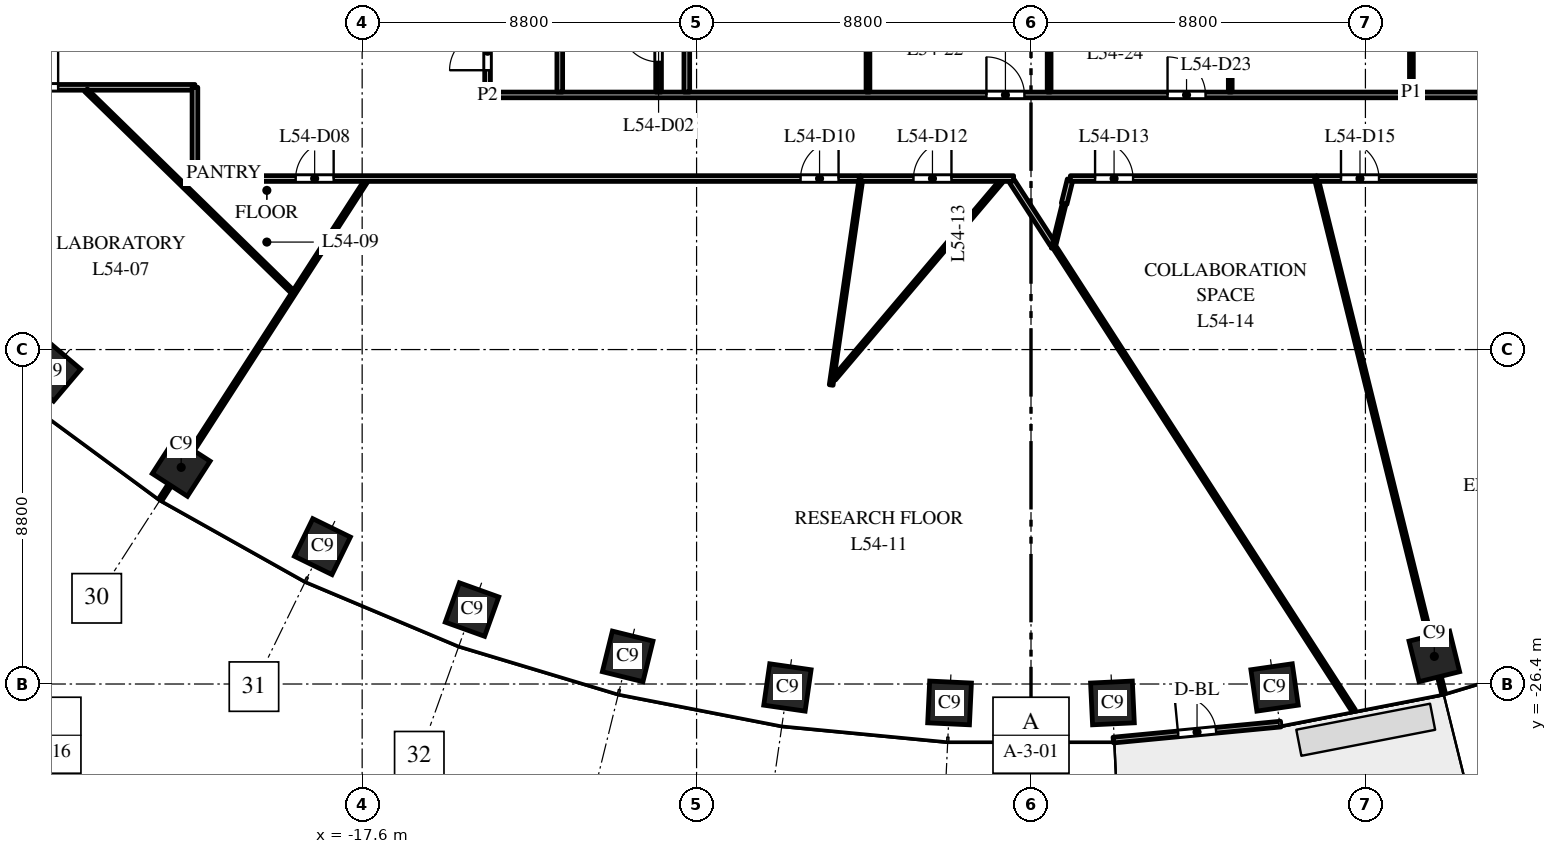
"""IFC4 building model, lengths in metres.
Left out: names, types, materials, properties, quantities, classifications, styles, units other than length and angle.
Written with IfcOpenShell. Run it as: python <this file> out.ifc"""

import sys

from ifc_helpers import new_model, si_unit, direction, frame, frame_2d, origin, origin_2d, place, context, subcontext, project, spatial, rectangle, extrude, element, fill, save


model = new_model("IFC4")
c1 = context("Model", 3, precision=1e-05, world=origin(), true_north=direction((0.0, 1.0)))
c2 = subcontext(c1, "Body", "Model", "MODEL_VIEW")
j1 = project(units=[si_unit("LENGTHUNIT", "METRE"), si_unit("PLANEANGLEUNIT", "RADIAN")], contexts=[c1])
p1 = place(None, origin())
s1 = spatial("IfcSite", under=j1, at=p1, CompositionType="ELEMENT")
p2 = place(p1, origin())
s2 = spatial("IfcBuilding", under=s1, at=p2, CompositionType="ELEMENT")
p3 = place(p2, frame((0.0, 0.0, 257.5)))
s3 = spatial("IfcBuildingStorey", under=s2, at=p3, CompositionType="ELEMENT", Elevation=257.5)
for number, where, z_axis, x_axis in (
    (1, (-25.783, -18.18, 0.0), (0.0, 0.0, 1.0), (0.763, -0.646, 0.0)),
    (2, (-22.362, -20.7, 0.0), (0.0, 0.0, 1.0), (0.84, -0.542, 0.0)),
    (3, (-18.646, -22.785, 0.0), (0.0, 0.0, 1.0), (0.898, -0.439, 0.0)),
    (4, (-14.709, -24.441, 0.0), (0.0, 0.0, 1.0), (0.941, -0.338, 0.0)),
    (5, (-10.613, -25.674, 0.0), (0.0, 0.0, 1.0), (0.971, -0.24, 0.0)),
    (6, (-6.409, -26.491, 0.0), (0.0, 0.0, 1.0), (0.99, -0.143, 0.0)),
    (7, (-2.143, -26.898, 0.0), (0.0, 0.0, 1.0), (0.999, -0.048, 0.0)),
    (8, (2.143, -26.898, 0.0), (0.0, 0.0, 1.0), (0.999, 0.048, 0.0)),
    (9, (6.409, -26.491, 0.0), (0.0, 0.0, 1.0), (0.99, 0.143, 0.0)),
    (10, (10.613, -25.674, 0.0), (0.0, 0.0, 1.0), (0.971, 0.24, 0.0)),
):
    element("IfcColumn", number, at=place(p3, frame(where, z_axis=z_axis, x_axis=x_axis)), inside=s3, PredefinedType="COLUMN", context=c2, shape_type="SweptSolid", body=[
        extrude(rectangle(XDim=1.1, YDim=1.1, at=origin_2d()), origin(), (0.0, 0.0, 1.0), 4.0),
    ])
p4 = place(p3, frame((2.166, -27.875, 0.0), z_axis=(0.0, 0.0, 1.0), x_axis=(0.995473879823, 0.095035543824, 0.0)))
e11 = element("IfcWall", 11, at=p4, inside=s3, PredefinedType="STANDARD", context=c2, shape_type="SweptSolid", body=[
    extrude(rectangle(XDim=4.426, YDim=0.15, at=frame_2d((2.213, 0.0))), origin(), (0.0, 0.0, 1.0), 3.7),
])
p5 = place(p4, frame((1.713, 0.0, 0.0)))
e12 = element("IfcOpeningElement", 12, at=p5, cuts=e11, PredefinedType="OPENING", context=c2, shape_type="SweptSolid", body=[
    extrude(rectangle(XDim=1.0, YDim=2.4, at=frame_2d((0.5, 1.2))), frame((0.0, 0.085, 0.0), z_axis=(0.0, -1.0, 0.0), x_axis=(1.0, 0.0, 0.0)), (0.0, 0.0, 1.0), 0.17),
])
p6 = place(p3, frame((-31.5, -10.7, 0.0), z_axis=(0.0, 0.0, 1.0), x_axis=(1.0, 0.0, 0.0)))
e13 = element("IfcWall", 13, at=p6, inside=s3, PredefinedType="PARTITIONING", context=c2, shape_type="SweptSolid", body=[
    extrude(rectangle(XDim=9.5, YDim=0.15, at=frame_2d((4.75, 0.0))), origin(), (0.0, 0.0, 1.0), 3.1),
])
p7 = place(p6, frame((4.9, 0.0, 0.0)))
e14 = element("IfcOpeningElement", 14, at=p7, cuts=e13, PredefinedType="OPENING", context=c2, shape_type="SweptSolid", body=[
    extrude(rectangle(XDim=1.0, YDim=2.1, at=frame_2d((0.5, 1.05))), frame((0.0, 0.085, 0.0), z_axis=(0.0, -1.0, 0.0), x_axis=(1.0, 0.0, 0.0)), (0.0, 0.0, 1.0), 0.17),
])
p8 = place(p3, frame((-24.866, -10.778, 0.0), z_axis=(0.0, 0.0, 1.0), x_axis=(0.715632814242, -0.698476681916, 0.0)))
e15 = element("IfcWall", 15, at=p8, inside=s3, PredefinedType="PARTITIONING", context=c2, shape_type="SweptSolid", body=[
    extrude(rectangle(XDim=7.585, YDim=0.1, at=frame_2d((3.792, 0.0))), origin(), (0.0, 0.0, 1.0), 2.75),
])
p9 = place(p3, frame((-22.905, -21.542, 0.0), z_axis=(0.0, 0.0, 1.0), x_axis=(0.542277075573, 0.840199722273, 0.0)))
e16 = element("IfcWall", 16, at=p9, inside=s3, PredefinedType="PARTITIONING", context=c2, shape_type="SweptSolid", body=[
    extrude(rectangle(XDim=9.958, YDim=0.1, at=frame_2d((4.979, 0.0))), origin(), (0.0, 0.0, 1.0), 3.0),
])
p10 = place(p3, frame((-22.0, -13.1, 0.0), z_axis=(0.0, 0.0, 1.0), x_axis=(0.0, 1.0, 0.0)))
e17 = element("IfcWall", 17, at=p10, inside=s3, PredefinedType="PARTITIONING", context=c2, shape_type="SweptSolid", body=[
    extrude(rectangle(XDim=2.4, YDim=0.15, at=frame_2d((1.2, 0.0))), origin(), (0.0, 0.0, 1.0), 3.7),
])
p11 = place(p3, frame((-22.0, -13.1, 0.0), z_axis=(0.0, 0.0, 1.0), x_axis=(1.0, 0.0, 0.0)))
e18 = element("IfcWall", 18, at=p11, inside=s3, PredefinedType="PARTITIONING", context=c2, shape_type="SweptSolid", body=[
    extrude(rectangle(XDim=17.507, YDim=0.15, at=frame_2d((8.753, 0.0))), origin(), (0.0, 0.0, 1.0), 2.75),
])
p12 = place(p11, frame((2.65, 0.0, 0.0)))
e19 = element("IfcOpeningElement", 19, at=p12, cuts=e18, PredefinedType="OPENING", context=c2, shape_type="SweptSolid", body=[
    extrude(rectangle(XDim=1.0, YDim=2.1, at=frame_2d((0.5, 1.05))), frame((0.0, 0.085, 0.0), z_axis=(0.0, -1.0, 0.0), x_axis=(1.0, 0.0, 0.0)), (0.0, 0.0, 1.0), 0.17),
])
p13 = place(p11, frame((15.936, 0.0, 0.0)))
e20 = element("IfcOpeningElement", 20, at=p13, cuts=e18, PredefinedType="OPENING", context=c2, shape_type="SweptSolid", body=[
    extrude(rectangle(XDim=1.0, YDim=2.1, at=frame_2d((0.5, 1.05))), frame((0.0, 0.085, 0.0), z_axis=(0.0, -1.0, 0.0), x_axis=(1.0, 0.0, 0.0)), (0.0, 0.0, 1.0), 0.17),
])
p14 = place(p3, frame((-14.3, -10.9, 0.0), z_axis=(0.0, 0.0, 1.0), x_axis=(0.0, 1.0, 0.0)))
e21 = element("IfcWall", 21, at=p14, inside=s3, PredefinedType="PARTITIONING", context=c2, shape_type="SweptSolid", body=[
    extrude(rectangle(XDim=21.8, YDim=0.15, at=frame_2d((10.9, 0.0))), origin(), (0.0, 0.0, 1.0), 2.75),
])
p15 = place(p14, frame((0.65, 0.0, 0.0)))
e22 = element("IfcOpeningElement", 22, at=p15, cuts=e21, PredefinedType="OPENING", context=c2, shape_type="SweptSolid", body=[
    extrude(rectangle(XDim=1.0, YDim=2.1, at=frame_2d((0.5, 1.05))), frame((0.0, 0.085, 0.0), z_axis=(0.0, -1.0, 0.0), x_axis=(1.0, 0.0, 0.0)), (0.0, 0.0, 1.0), 0.17),
])
p16 = place(p3, frame((-14.3, -10.9, 0.0), z_axis=(0.0, 0.0, 1.0), x_axis=(1.0, 0.0, 0.0)))
e23 = element("IfcWall", 23, at=p16, inside=s3, PredefinedType="PARTITIONING", context=c2, shape_type="SweptSolid", body=[
    extrude(rectangle(XDim=28.6, YDim=0.15, at=frame_2d((14.3, 0.0))), origin(), (0.0, 0.0, 1.0), 2.85),
])
p17 = place(p16, frame((13.127, 0.0, 0.0)))
e24 = element("IfcOpeningElement", 24, at=p17, cuts=e23, PredefinedType="OPENING", context=c2, shape_type="SweptSolid", body=[
    extrude(rectangle(XDim=1.0, YDim=2.1, at=frame_2d((0.5, 1.05))), frame((0.0, 0.085, 0.0), z_axis=(0.0, -1.0, 0.0), x_axis=(1.0, 0.0, 0.0)), (0.0, 0.0, 1.0), 0.17),
])
p18 = place(p16, frame((17.893, 0.0, 0.0)))
e25 = element("IfcOpeningElement", 25, at=p18, cuts=e23, PredefinedType="OPENING", context=c2, shape_type="SweptSolid", body=[
    extrude(rectangle(XDim=1.0, YDim=2.1, at=frame_2d((0.5, 1.05))), frame((0.0, 0.085, 0.0), z_axis=(0.0, -1.0, 0.0), x_axis=(1.0, 0.0, 0.0)), (0.0, 0.0, 1.0), 0.17),
])
p19 = place(p3, frame((-12.4, -10.825, 0.0), z_axis=(0.0, 0.0, 1.0), x_axis=(0.0, 1.0, 0.0)))
e26 = element("IfcWall", 26, at=p19, inside=s3, PredefinedType="PARTITIONING", context=c2, shape_type="SweptSolid", body=[
    extrude(rectangle(XDim=7.065, YDim=0.15, at=frame_2d((3.532, 0.0))), origin(), (0.0, 0.0, 1.0), 2.75),
])
p20 = place(p19, frame((3.095, 0.0, 0.0)))
e27 = element("IfcOpeningElement", 27, at=p20, cuts=e26, PredefinedType="OPENING", context=c2, shape_type="SweptSolid", body=[
    extrude(rectangle(XDim=1.0, YDim=2.1, at=frame_2d((0.5, 1.05))), frame((0.0, 0.085, 0.0), z_axis=(0.0, -1.0, 0.0), x_axis=(1.0, 0.0, 0.0)), (0.0, 0.0, 1.0), 0.17),
])
p21 = place(p19, frame((5.447, 0.0, 0.0)))
e28 = element("IfcOpeningElement", 28, at=p21, cuts=e26, PredefinedType="OPENING", context=c2, shape_type="SweptSolid", body=[
    extrude(rectangle(XDim=1.0, YDim=2.1, at=frame_2d((0.5, 1.05))), frame((0.0, 0.085, 0.0), z_axis=(0.0, -1.0, 0.0), x_axis=(1.0, 0.0, 0.0)), (0.0, 0.0, 1.0), 0.17),
])
p22 = place(p3, frame((-9.8, -10.825, 0.0), z_axis=(0.0, 0.0, 1.0), x_axis=(0.0, 1.0, 0.0)))
e29 = element("IfcWall", 29, at=p22, inside=s3, PredefinedType="PARTITIONING", context=c2, shape_type="SweptSolid", body=[
    extrude(rectangle(XDim=7.065, YDim=0.15, at=frame_2d((3.532, 0.0))), origin(), (0.0, 0.0, 1.0), 2.75),
])
p23 = place(p22, frame((0.795, 0.0, 0.0)))
e30 = element("IfcOpeningElement", 30, at=p23, cuts=e29, PredefinedType="OPENING", context=c2, shape_type="SweptSolid", body=[
    extrude(rectangle(XDim=1.0, YDim=2.1, at=frame_2d((0.5, 1.05))), frame((0.0, 0.085, 0.0), z_axis=(0.0, -1.0, 0.0), x_axis=(1.0, 0.0, 0.0)), (0.0, 0.0, 1.0), 0.17),
])
p24 = place(p3, frame((-9.057, -10.825, 0.0), z_axis=(0.0, 0.0, 1.0), x_axis=(0.0, 1.0, 0.0)))
e31 = element("IfcWall", 31, at=p24, inside=s3, PredefinedType="PARTITIONING", context=c2, shape_type="SweptSolid", body=[
    extrude(rectangle(XDim=10.78, YDim=0.15, at=frame_2d((5.39, 0.0))), origin(), (0.0, 0.0, 1.0), 2.75),
])
p25 = place(p24, frame((2.075, 0.0, 0.0)))
e32 = element("IfcOpeningElement", 32, at=p25, cuts=e31, PredefinedType="OPENING", context=c2, shape_type="SweptSolid", body=[
    extrude(rectangle(XDim=1.0, YDim=2.1, at=frame_2d((0.5, 1.05))), frame((0.0, 0.085, 0.0), z_axis=(0.0, -1.0, 0.0), x_axis=(1.0, 0.0, 0.0)), (0.0, 0.0, 1.0), 0.17),
])
p26 = place(p3, frame((-5.258, -18.533, 0.0), z_axis=(0.0, 0.0, 1.0), x_axis=(0.143033857536, 0.989717795939, 0.0)))
e33 = element("IfcWall", 33, at=p26, inside=s3, PredefinedType="PARTITIONING", context=c2, shape_type="SweptSolid", body=[
    extrude(rectangle(XDim=5.489, YDim=0.1, at=frame_2d((2.745, 0.0))), origin(), (0.0, 0.0, 1.0), 3.7),
])
p27 = place(p3, frame((-5.184, -18.368, 0.0), z_axis=(0.0, 0.0, 1.0), x_axis=(0.646387569677, 0.763009246187, 0.0)))
e34 = element("IfcWall", 34, at=p27, inside=s3, PredefinedType="PARTITIONING", context=c2, shape_type="SweptSolid", body=[
    extrude(rectangle(XDim=6.806, YDim=0.1, at=frame_2d((3.403, 0.0))), origin(), (0.0, 0.0, 1.0), 2.85),
])
p28 = place(p3, frame((-4.473, -13.1, 0.0), z_axis=(0.0, 0.0, 1.0), x_axis=(1.0, 0.0, 0.0)))
e35 = element("IfcWall", 35, at=p28, inside=s3, PredefinedType="PARTITIONING", context=c2, shape_type="SweptSolid", body=[
    extrude(rectangle(XDim=4.015, YDim=0.15, at=frame_2d((2.007, 0.0))), origin(), (0.0, 0.0, 1.0), 2.85),
])
p29 = place(p28, frame((1.38, 0.0, 0.0)))
e36 = element("IfcOpeningElement", 36, at=p29, cuts=e35, PredefinedType="OPENING", context=c2, shape_type="SweptSolid", body=[
    extrude(rectangle(XDim=1.0, YDim=2.1, at=frame_2d((0.5, 1.05))), frame((0.0, 0.085, 0.0), z_axis=(0.0, -1.0, 0.0), x_axis=(1.0, 0.0, 0.0)), (0.0, 0.0, 1.0), 0.17),
])
p30 = place(p3, frame((-4.29, -10.825, 0.0), z_axis=(0.0, 0.0, 1.0), x_axis=(0.0, 1.0, 0.0)))
e37 = element("IfcWall", 37, at=p30, inside=s3, PredefinedType="PARTITIONING", context=c2, shape_type="SweptSolid", body=[
    extrude(rectangle(XDim=4.257, YDim=0.1, at=frame_2d((2.128, 0.0))), origin(), (0.0, 0.0, 1.0), 2.85),
])
p31 = place(p3, frame((-0.499, -13.175, 0.0), z_axis=(0.0, 0.0, 1.0), x_axis=(0.543076749494, -0.839683061732, 0.0)))
e38 = element("IfcWall", 38, at=p31, inside=s3, PredefinedType="PARTITIONING", context=c2, shape_type="SweptSolid", body=[
    extrude(rectangle(XDim=1.972, YDim=0.15, at=frame_2d((0.986, 0.0))), origin(), (0.0, 0.0, 1.0), 3.7),
])
p32 = place(p3, frame((0.477, -10.825, 0.0), z_axis=(0.0, 0.0, 1.0), x_axis=(0.0, 1.0, 0.0)))
e39 = element("IfcWall", 39, at=p32, inside=s3, PredefinedType="PARTITIONING", context=c2, shape_type="SweptSolid", body=[
    extrude(rectangle(XDim=3.357, YDim=0.1, at=frame_2d((1.678, 0.0))), origin(), (0.0, 0.0, 1.0), 3.0),
])
p33 = place(p3, frame((0.582, -14.941, 0.0), z_axis=(0.0, 0.0, 1.0), x_axis=(0.239461959579, 0.970905747184, 0.0)))
e40 = element("IfcWall", 40, at=p33, inside=s3, PredefinedType="PARTITIONING", context=c2, shape_type="SweptSolid", body=[
    extrude(rectangle(XDim=1.215, YDim=0.1, at=frame_2d((0.608, 0.0))), origin(), (0.0, 0.0, 1.0), 3.7),
])
p34 = place(p3, frame((0.635, -14.932, 0.0), z_axis=(0.0, 0.0, 1.0), x_axis=(0.54231954128, -0.840172312771, 0.0)))
e41 = element("IfcWall", 41, at=p34, inside=s3, PredefinedType="PARTITIONING", context=c2, shape_type="SweptSolid", body=[
    extrude(rectangle(XDim=14.488, YDim=0.1, at=frame_2d((7.244, 0.0))), origin(), (0.0, 0.0, 1.0), 2.85),
])
p35 = place(p3, frame((0.872, -13.761, 0.0), z_axis=(0.0, 0.0, 1.0), x_axis=(0.241387149241, 0.970428897025, 0.0)))
e42 = element("IfcWall", 42, at=p35, inside=s3, PredefinedType="PARTITIONING", context=c2, shape_type="SweptSolid", body=[
    extrude(rectangle(XDim=0.65, YDim=0.15, at=frame_2d((0.325, 0.0))), origin(), (0.0, 0.0, 1.0), 3.7),
])
p36 = place(p3, frame((1.036, -13.1, 0.0), z_axis=(0.0, 0.0, 1.0), x_axis=(1.0, 0.0, 0.0)))
e43 = element("IfcWall", 43, at=p36, inside=s3, PredefinedType="PARTITIONING", context=c2, shape_type="SweptSolid", body=[
    extrude(rectangle(XDim=6.471, YDim=0.15, at=frame_2d((3.236, 0.0))), origin(), (0.0, 0.0, 1.0), 2.85),
])
p37 = place(p36, frame((0.65, 0.0, 0.0)))
e44 = element("IfcOpeningElement", 44, at=p37, cuts=e43, PredefinedType="OPENING", context=c2, shape_type="SweptSolid", body=[
    extrude(rectangle(XDim=1.0, YDim=2.1, at=frame_2d((0.5, 1.05))), frame((0.0, 0.085, 0.0), z_axis=(0.0, -1.0, 0.0), x_axis=(1.0, 0.0, 0.0)), (0.0, 0.0, 1.0), 0.17),
])
p38 = place(p3, frame((5.243, -10.825, 0.0), z_axis=(0.0, 0.0, 1.0), x_axis=(0.0, 1.0, 0.0)))
e45 = element("IfcWall", 45, at=p38, inside=s3, PredefinedType="PARTITIONING", context=c2, shape_type="SweptSolid", body=[
    extrude(rectangle(XDim=4.766, YDim=0.1, at=frame_2d((2.383, 0.0))), origin(), (0.0, 0.0, 1.0), 2.85),
])
p39 = place(p3, frame((7.507, -13.1, 0.0), z_axis=(0.0, 0.0, 1.0), x_axis=(0.239932883661, -0.970789478382, 0.0)))
e46 = element("IfcWall", 46, at=p39, inside=s3, PredefinedType="PARTITIONING", context=c2, shape_type="SweptSolid", body=[
    extrude(rectangle(XDim=13.953, YDim=0.1, at=frame_2d((6.977, 0.0))), origin(), (0.0, 0.0, 1.0), 3.0),
])
p40 = place(p3, frame((7.524, -13.1, 0.0), z_axis=(0.0, 0.0, 1.0), x_axis=(1.0, 0.0, 0.0)))
e47 = element("IfcWall", 47, at=p40, inside=s3, PredefinedType="PARTITIONING", context=c2, shape_type="SweptSolid", body=[
    extrude(rectangle(XDim=14.052, YDim=0.15, at=frame_2d((7.026, 0.0))), origin(), (0.0, 0.0, 1.0), 2.85),
])
p41 = place(p40, frame((0.633, 0.0, 0.0)))
e48 = element("IfcOpeningElement", 48, at=p41, cuts=e47, PredefinedType="OPENING", context=c2, shape_type="SweptSolid", body=[
    extrude(rectangle(XDim=1.0, YDim=2.1, at=frame_2d((0.5, 1.05))), frame((0.0, 0.085, 0.0), z_axis=(0.0, -1.0, 0.0), x_axis=(1.0, 0.0, 0.0)), (0.0, 0.0, 1.0), 0.17),
])
p42 = place(p3, frame((10.01, -10.825, 0.0), z_axis=(0.0, 0.0, 1.0), x_axis=(0.0, 1.0, 0.0)))
e49 = element("IfcWall", 49, at=p42, inside=s3, PredefinedType="PARTITIONING", context=c2, shape_type="SweptSolid", body=[
    extrude(rectangle(XDim=21.65, YDim=0.1, at=frame_2d((10.825, 0.0))), origin(), (0.0, 0.0, 1.0), 2.75),
])
p43 = place(p5, origin())
e50 = element("IfcDoor", 50, at=p43, inside=s3, OperationType="SINGLE_SWING_LEFT", PredefinedType="DOOR", context=c2, shape_type="SweptSolid", body=[
    extrude(rectangle(XDim=1.0, YDim=2.4, at=frame_2d((0.5, 1.2))), frame((0.0, 0.025, 0.0), z_axis=(0.0, -1.0, 0.0), x_axis=(1.0, 0.0, 0.0)), (0.0, 0.0, 1.0), 0.05),
])
fill(e12, e50)
p44 = place(p15, origin())
e51 = element("IfcDoor", 51, at=p44, inside=s3, OperationType="SINGLE_SWING_LEFT", PredefinedType="DOOR", context=c2, shape_type="SweptSolid", body=[
    extrude(rectangle(XDim=1.0, YDim=2.1, at=frame_2d((0.5, 1.05))), frame((0.0, 0.025, 0.0), z_axis=(0.0, -1.0, 0.0), x_axis=(1.0, 0.0, 0.0)), (0.0, 0.0, 1.0), 0.05),
])
fill(e22, e51)
p45 = place(p23, origin())
e52 = element("IfcDoor", 52, at=p45, inside=s3, OperationType="SINGLE_SWING_RIGHT", PredefinedType="DOOR", context=c2, shape_type="SweptSolid", body=[
    extrude(rectangle(XDim=1.0, YDim=2.1, at=frame_2d((0.5, 1.05))), frame((0.0, 0.025, 0.0), z_axis=(0.0, -1.0, 0.0), x_axis=(1.0, 0.0, 0.0)), (0.0, 0.0, 1.0), 0.05),
])
fill(e30, e52)
p46 = place(p7, origin())
e53 = element("IfcDoor", 53, at=p46, inside=s3, OperationType="SINGLE_SWING_RIGHT", PredefinedType="DOOR", context=c2, shape_type="SweptSolid", body=[
    extrude(rectangle(XDim=1.0, YDim=2.1, at=frame_2d((0.5, 1.05))), frame((0.0, 0.025, 0.0), z_axis=(0.0, -1.0, 0.0), x_axis=(1.0, 0.0, 0.0)), (0.0, 0.0, 1.0), 0.05),
])
fill(e14, e53)
p47 = place(p12, origin())
e54 = element("IfcDoor", 54, at=p47, inside=s3, OperationType="SINGLE_SWING_RIGHT", PredefinedType="DOOR", context=c2, shape_type="SweptSolid", body=[
    extrude(rectangle(XDim=1.0, YDim=2.1, at=frame_2d((0.5, 1.05))), frame((0.0, 0.025, 0.0), z_axis=(0.0, -1.0, 0.0), x_axis=(1.0, 0.0, 0.0)), (0.0, 0.0, 1.0), 0.05),
])
fill(e19, e54)
p48 = place(p13, origin())
e55 = element("IfcDoor", 55, at=p48, inside=s3, OperationType="SINGLE_SWING_RIGHT", PredefinedType="DOOR", context=c2, shape_type="SweptSolid", body=[
    extrude(rectangle(XDim=1.0, YDim=2.1, at=frame_2d((0.5, 1.05))), frame((0.0, 0.025, 0.0), z_axis=(0.0, -1.0, 0.0), x_axis=(1.0, 0.0, 0.0)), (0.0, 0.0, 1.0), 0.05),
])
fill(e20, e55)
p49 = place(p29, origin())
e56 = element("IfcDoor", 56, at=p49, inside=s3, OperationType="SINGLE_SWING_RIGHT", PredefinedType="DOOR", context=c2, shape_type="SweptSolid", body=[
    extrude(rectangle(XDim=1.0, YDim=2.1, at=frame_2d((0.5, 1.05))), frame((0.0, 0.025, 0.0), z_axis=(0.0, -1.0, 0.0), x_axis=(1.0, 0.0, 0.0)), (0.0, 0.0, 1.0), 0.05),
])
fill(e36, e56)
p50 = place(p37, origin())
e57 = element("IfcDoor", 57, at=p50, inside=s3, OperationType="SINGLE_SWING_LEFT", PredefinedType="DOOR", context=c2, shape_type="SweptSolid", body=[
    extrude(rectangle(XDim=1.0, YDim=2.1, at=frame_2d((0.5, 1.05))), frame((0.0, 0.025, 0.0), z_axis=(0.0, -1.0, 0.0), x_axis=(1.0, 0.0, 0.0)), (0.0, 0.0, 1.0), 0.05),
])
fill(e44, e57)
p51 = place(p41, origin())
e58 = element("IfcDoor", 58, at=p51, inside=s3, OperationType="SINGLE_SWING_LEFT", PredefinedType="DOOR", context=c2, shape_type="SweptSolid", body=[
    extrude(rectangle(XDim=1.0, YDim=2.1, at=frame_2d((0.5, 1.05))), frame((0.0, 0.025, 0.0), z_axis=(0.0, -1.0, 0.0), x_axis=(1.0, 0.0, 0.0)), (0.0, 0.0, 1.0), 0.05),
])
fill(e48, e58)
p52 = place(p17, origin())
e59 = element("IfcDoor", 59, at=p52, inside=s3, OperationType="SINGLE_SWING_LEFT", PredefinedType="DOOR", context=c2, shape_type="SweptSolid", body=[
    extrude(rectangle(XDim=1.0, YDim=2.1, at=frame_2d((0.5, 1.05))), frame((0.0, 0.025, 0.0), z_axis=(0.0, -1.0, 0.0), x_axis=(1.0, 0.0, 0.0)), (0.0, 0.0, 1.0), 0.05),
])
fill(e24, e59)
p53 = place(p18, origin())
e60 = element("IfcDoor", 60, at=p53, inside=s3, OperationType="SINGLE_SWING_LEFT", PredefinedType="DOOR", context=c2, shape_type="SweptSolid", body=[
    extrude(rectangle(XDim=1.0, YDim=2.1, at=frame_2d((0.5, 1.05))), frame((0.0, 0.025, 0.0), z_axis=(0.0, -1.0, 0.0), x_axis=(1.0, 0.0, 0.0)), (0.0, 0.0, 1.0), 0.05),
])
fill(e25, e60)
save(model, sys.argv[1])
